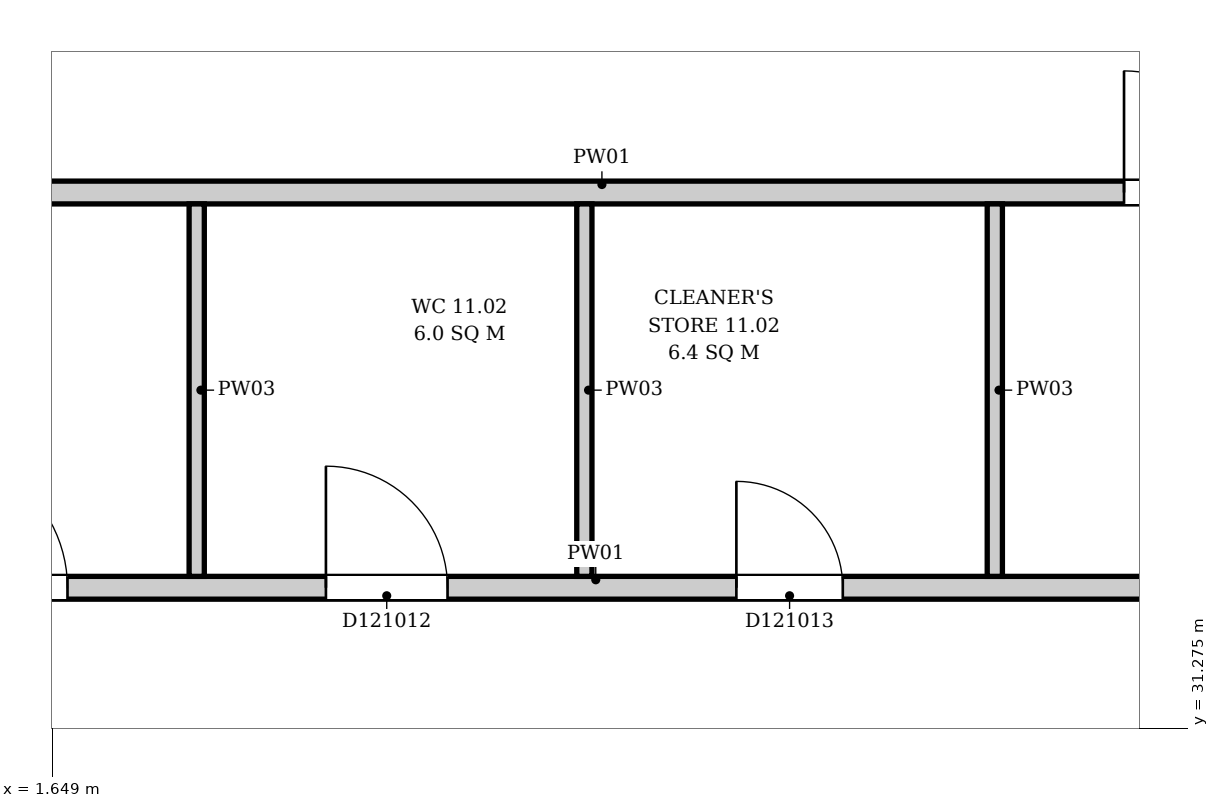
"""IFC4 building model, lengths in metres.
Left out: names, types, materials, properties, quantities, classifications, styles, units other than length and angle.
Written with IfcOpenShell. Run it as: python <this file> out.ifc"""

import sys

from ifc_helpers import new_model, si_unit, direction, frame, frame_2d, origin, place, context, subcontext, project, spatial, rectangle, extrude, element, fill, save


model = new_model("IFC4")
c1 = context("Model", 3, precision=1e-05, world=origin(), true_north=direction((0.0, 1.0)))
c2 = subcontext(c1, "Body", "Model", "MODEL_VIEW")
j1 = project(units=[si_unit("LENGTHUNIT", "METRE"), si_unit("PLANEANGLEUNIT", "RADIAN")], contexts=[c1])
p1 = place(None, origin())
s1 = spatial("IfcSite", under=j1, at=p1, CompositionType="ELEMENT")
p2 = place(p1, origin())
s2 = spatial("IfcBuilding", under=s1, at=p2, CompositionType="ELEMENT")
p3 = place(p2, frame((0.0, 0.0, 57.1)))
s3 = spatial("IfcBuildingStorey", under=s2, at=p3, CompositionType="ELEMENT", Elevation=57.1)
p4 = place(p3, frame((0.056, 32.2, 0.0), z_axis=(0.0, 0.0, 1.0), x_axis=(1.0, 0.0, 0.0)))
e1 = element("IfcWall", 1, at=p4, inside=s3, PredefinedType="PARTITIONING", context=c2, shape_type="SweptSolid", body=[
    extrude(rectangle(XDim=10.338, YDim=0.15, at=frame_2d((5.169, 0.0))), origin(), (0.0, 0.0, 1.0), 3.9),
])
p5 = place(p4, frame((0.794, 0.0, 0.0)))
e2 = element("IfcOpeningElement", 2, at=p5, cuts=e1, PredefinedType="OPENING", context=c2, shape_type="SweptSolid", body=[
    extrude(rectangle(XDim=0.9, YDim=2.1, at=frame_2d((0.45, 1.05))), frame((0.0, 0.085, 0.0), z_axis=(0.0, -1.0, 0.0), x_axis=(1.0, 0.0, 0.0)), (0.0, 0.0, 1.0), 0.17),
])
p6 = place(p4, frame((3.394, 0.0, 0.0)))
e3 = element("IfcOpeningElement", 3, at=p6, cuts=e1, PredefinedType="OPENING", context=c2, shape_type="SweptSolid", body=[
    extrude(rectangle(XDim=0.8, YDim=2.1, at=frame_2d((0.4, 1.05))), frame((0.0, 0.085, 0.0), z_axis=(0.0, -1.0, 0.0), x_axis=(1.0, 0.0, 0.0)), (0.0, 0.0, 1.0), 0.17),
])
p7 = place(p4, frame((6.094, 0.0, 0.0)))
e4 = element("IfcOpeningElement", 4, at=p7, cuts=e1, PredefinedType="OPENING", context=c2, shape_type="SweptSolid", body=[
    extrude(rectangle(XDim=0.7, YDim=2.1, at=frame_2d((0.35, 1.05))), frame((0.0, 0.085, 0.0), z_axis=(0.0, -1.0, 0.0), x_axis=(1.0, 0.0, 0.0)), (0.0, 0.0, 1.0), 0.17),
])
p8 = place(p3, frame((0.056, 34.8, 0.0), z_axis=(0.0, 0.0, 1.0), x_axis=(1.0, 0.0, 0.0)))
e5 = element("IfcWall", 5, at=p8, inside=s3, PredefinedType="PARTITIONING", context=c2, shape_type="SweptSolid", body=[
    extrude(rectangle(XDim=10.419, YDim=0.15, at=frame_2d((5.209, 0.0))), origin(), (0.0, 0.0, 1.0), 3.9),
])
p9 = place(p8, frame((8.644, 0.0, 0.0)))
e6 = element("IfcOpeningElement", 6, at=p9, cuts=e5, PredefinedType="OPENING", context=c2, shape_type="SweptSolid", body=[
    extrude(rectangle(XDim=0.8, YDim=2.1, at=frame_2d((0.4, 1.05))), frame((0.0, 0.085, 0.0), z_axis=(0.0, -1.0, 0.0), x_axis=(1.0, 0.0, 0.0)), (0.0, 0.0, 1.0), 0.17),
])
for number, where, z_axis, x_axis in (
    (7, (2.6, 32.275, 0.0), (0.0, 0.0, 1.0), (0.0, 1.0, 0.0)),
    (8, (5.15, 32.275, 0.0), (0.0, 0.0, 1.0), (0.0, 1.0, 0.0)),
    (9, (7.85, 32.275, 0.0), (0.0, 0.0, 1.0), (0.0, 1.0, 0.0)),
):
    element("IfcWall", number, at=place(p3, frame(where, z_axis=z_axis, x_axis=x_axis)), inside=s3, PredefinedType="PARTITIONING", context=c2, shape_type="SweptSolid", body=[
        extrude(rectangle(XDim=2.45, YDim=0.1, at=frame_2d((1.225, 0.0))), origin(), (0.0, 0.0, 1.0), 3.9),
    ])
p10 = place(p5, origin())
e10 = element("IfcDoor", 10, at=p10, inside=s3, OperationType="SINGLE_SWING_RIGHT", PredefinedType="DOOR", context=c2, shape_type="SweptSolid", body=[
    extrude(rectangle(XDim=0.9, YDim=2.1, at=frame_2d((0.45, 1.05))), frame((0.0, 0.025, 0.0), z_axis=(0.0, -1.0, 0.0), x_axis=(1.0, 0.0, 0.0)), (0.0, 0.0, 1.0), 0.05),
])
fill(e2, e10)
p11 = place(p6, origin())
e11 = element("IfcDoor", 11, at=p11, inside=s3, OperationType="SINGLE_SWING_RIGHT", PredefinedType="DOOR", context=c2, shape_type="SweptSolid", body=[
    extrude(rectangle(XDim=0.8, YDim=2.1, at=frame_2d((0.4, 1.05))), frame((0.0, 0.025, 0.0), z_axis=(0.0, -1.0, 0.0), x_axis=(1.0, 0.0, 0.0)), (0.0, 0.0, 1.0), 0.05),
])
fill(e3, e11)
p12 = place(p7, origin())
e12 = element("IfcDoor", 12, at=p12, inside=s3, OperationType="SINGLE_SWING_RIGHT", PredefinedType="DOOR", context=c2, shape_type="SweptSolid", body=[
    extrude(rectangle(XDim=0.7, YDim=2.1, at=frame_2d((0.35, 1.05))), frame((0.0, 0.025, 0.0), z_axis=(0.0, -1.0, 0.0), x_axis=(1.0, 0.0, 0.0)), (0.0, 0.0, 1.0), 0.05),
])
fill(e4, e12)
p13 = place(p9, origin())
e13 = element("IfcDoor", 13, at=p13, inside=s3, OperationType="SINGLE_SWING_LEFT", PredefinedType="DOOR", context=c2, shape_type="SweptSolid", body=[
    extrude(rectangle(XDim=0.8, YDim=2.1, at=frame_2d((0.4, 1.05))), frame((0.0, 0.025, 0.0), z_axis=(0.0, -1.0, 0.0), x_axis=(1.0, 0.0, 0.0)), (0.0, 0.0, 1.0), 0.05),
])
fill(e6, e13)
save(model, sys.argv[1])
